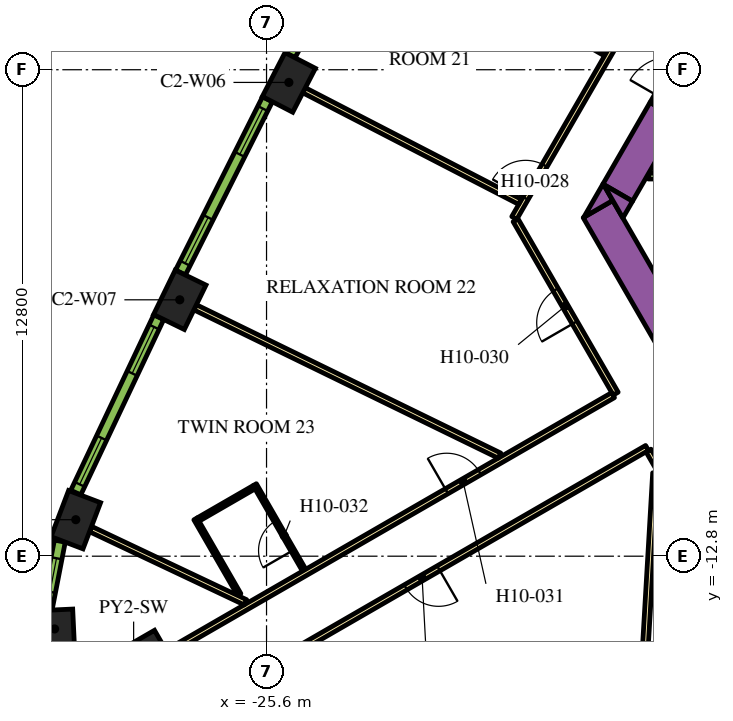
"""IFC4 building model, lengths in metres.
Left out: names, types, materials, properties, quantities, classifications, styles, units other than length and angle.
Written with IfcOpenShell. Run it as: python <this file> out.ifc"""

import sys

from ifc_helpers import new_model, si_unit, direction, frame, frame_2d, origin, origin_2d, place, context, subcontext, project, spatial, polyline, rectangle, outline, extrude, element, fill, save


model = new_model("IFC4")
c1 = context("Model", 3, precision=1e-05, world=origin(), true_north=direction((0.0, 1.0)))
c2 = subcontext(c1, "Body", "Model", "MODEL_VIEW")
j1 = project(units=[si_unit("LENGTHUNIT", "METRE"), si_unit("PLANEANGLEUNIT", "RADIAN")], contexts=[c1])
p1 = place(None, origin())
s1 = spatial("IfcSite", under=j1, at=p1, CompositionType="ELEMENT")
p2 = place(p1, origin())
s2 = spatial("IfcBuilding", under=s1, at=p2, CompositionType="ELEMENT")
p3 = place(p2, frame((0.0, 0.0, 130.5)))
s3 = spatial("IfcBuildingStorey", under=s2, at=p3, CompositionType="ELEMENT", Elevation=130.5)
p4 = place(p3, frame((-29.097, -16.799, 0.0), z_axis=(0.0, 0.0, 1.0), x_axis=(-0.866025403784, -0.5, 0.0)))
e1 = element("IfcColumn", 1, at=p4, inside=s3, PredefinedType="COLUMN", context=c2, shape_type="SweptSolid", body=[
    extrude(rectangle(XDim=3.0, YDim=3.0, at=origin_2d()), origin(), (0.0, 0.0, 1.0), 3.9),
])
for number, where, z_axis, x_axis in (
    (2, (-25.012, -0.334, 0.0), (0.0, 0.0, 1.0), (-0.459, -0.888, 0.0)),
    (3, (-27.883, -6.054, 0.0), (0.0, 0.0, 1.0), (-0.438, -0.899, 0.0)),
    (4, (-30.619, -11.839, 0.0), (0.0, 0.0, 1.0), (-0.355, -0.935, 0.0)),
):
    element("IfcColumn", number, at=place(p3, frame(where, z_axis=z_axis, x_axis=x_axis)), inside=s3, PredefinedType="COLUMN", context=c2, shape_type="SweptSolid", body=[
        extrude(rectangle(XDim=1.3, YDim=0.9, at=origin_2d()), origin(), (0.0, 0.0, 1.0), 3.9),
    ])
p5 = place(p3, frame((-31.177, -14.714, 0.0), z_axis=(0.0, 0.0, 1.0), x_axis=(0.046756026083, -0.998906338965, 0.0)))
e5 = element("IfcColumn", 5, at=p5, inside=s3, PredefinedType="COLUMN", context=c2, shape_type="SweptSolid", body=[
    extrude(rectangle(XDim=1.0, YDim=1.0, at=origin_2d()), origin(), (0.0, 0.0, 1.0), 3.9),
])
p6 = place(p3, frame((-12.134, -11.883, 0.0), z_axis=(0.0, 0.0, 1.0), x_axis=(-0.500005339912, 0.866022320763, 0.0)))
e6 = element("IfcWall", 6, at=p6, inside=s3, PredefinedType="SOLIDWALL", context=c2, shape_type="SweptSolid", body=[
    extrude(rectangle(XDim=9.488, YDim=0.9, at=frame_2d((4.744, 0.0))), origin(), (0.0, 0.0, 1.0), 3.9),
])
p7 = place(p3, origin())
e7 = element("IfcWall", 7, at=p7, inside=s3, PredefinedType="SOLIDWALL", context=c2, shape_type="SweptSolid", body=[
    extrude(outline(polyline([(-16.489, -3.44), (-17.251, -3.88), (-16.743, -3.0), (-16.489, -3.44)])), origin(), (0.0, 0.0, 1.0), 3.9),
])
p8 = place(p3, frame((-15.118, -1.085, 0.0), z_axis=(0.0, 0.0, 1.0), x_axis=(-0.50006606081, -0.865987260198, 0.0)))
e8 = element("IfcWall", 8, at=p8, inside=s3, PredefinedType="SOLIDWALL", context=c2, shape_type="SweptSolid", body=[
    extrude(rectangle(XDim=2.481, YDim=0.9, at=frame_2d((1.24, 0.0))), origin(), (0.0, 0.0, 1.0), 3.9),
])
e9 = element("IfcWall", 9, at=p7, inside=s3, PredefinedType="SOLIDWALL", context=c2, shape_type="SweptSolid", body=[
    extrude(outline(polyline([(-16.223, -3.9), (-16.732, -3.02), (-15.969, -3.46), (-16.223, -3.9)])), origin(), (0.0, 0.0, 1.0), 3.9),
])
p9 = place(p3, frame((-12.915, -2.8, 0.0), z_axis=(0.0, 0.0, 1.0), x_axis=(-1.0, 0.0, 0.0)))
e10 = element("IfcWall", 10, at=p9, inside=s3, PredefinedType="PARTITIONING", context=c2, shape_type="SweptSolid", body=[
    extrude(rectangle(XDim=2.637, YDim=0.15, at=frame_2d((1.318, 0.0))), origin(), (0.0, 0.0, 1.0), 2.6),
])
p10 = place(p3, frame((-15.118, -1.085, 0.0), z_axis=(0.0, 0.0, 1.0), x_axis=(0.500000056704, 0.866025371046, 0.0)))
e11 = element("IfcWall", 11, at=p10, inside=s3, PredefinedType="SOLIDWALL", context=c2, shape_type="SweptSolid", body=[
    extrude(rectangle(XDim=1.7, YDim=0.9, at=frame_2d((0.85, 0.0))), origin(), (0.0, 0.0, 1.0), 3.9),
])
p11 = place(p10, frame((0.25, 0.0, 0.0)))
e12 = element("IfcOpeningElement", 12, at=p11, cuts=e11, PredefinedType="OPENING", context=c2, shape_type="SweptSolid", body=[
    extrude(rectangle(XDim=1.2, YDim=2.1, at=frame_2d((0.6, 1.05))), frame((0.0, 0.46, 0.0), z_axis=(0.0, -1.0, 0.0), x_axis=(1.0, 0.0, 0.0)), (0.0, 0.0, 1.0), 0.92),
])
p12 = place(p3, frame((-19.081, -3.9, 0.0), z_axis=(0.0, 0.0, 1.0), x_axis=(0.499998313975, 0.866026377209, 0.0)))
e13 = element("IfcWall", 13, at=p12, inside=s3, PredefinedType="PARTITIONING", context=c2, shape_type="SweptSolid", body=[
    extrude(rectangle(XDim=25.766, YDim=0.15, at=frame_2d((12.883, 0.0))), origin(), (0.0, 0.0, 1.0), 2.6),
])
p13 = place(p12, frame((24.141, 0.0, 0.0)))
e14 = element("IfcOpeningElement", 14, at=p13, cuts=e13, PredefinedType="OPENING", context=c2, shape_type="SweptSolid", body=[
    extrude(rectangle(XDim=1.1, YDim=2.1, at=frame_2d((0.55, 1.05))), frame((0.0, 0.085, 0.0), z_axis=(0.0, -1.0, 0.0), x_axis=(1.0, 0.0, 0.0)), (0.0, 0.0, 1.0), 0.17),
])
p14 = place(p12, frame((13.144, 0.0, 0.0)))
e15 = element("IfcOpeningElement", 15, at=p14, cuts=e13, PredefinedType="OPENING", context=c2, shape_type="SweptSolid", body=[
    extrude(rectangle(XDim=1.0, YDim=2.1, at=frame_2d((0.5, 1.05))), frame((0.0, 0.085, 0.0), z_axis=(0.0, -1.0, 0.0), x_axis=(1.0, 0.0, 0.0)), (0.0, 0.0, 1.0), 0.17),
])
p15 = place(p12, frame((11.593, 0.0, 0.0)))
e16 = element("IfcOpeningElement", 16, at=p15, cuts=e13, PredefinedType="OPENING", context=c2, shape_type="SweptSolid", body=[
    extrude(rectangle(XDim=1.1, YDim=2.1, at=frame_2d((0.55, 1.05))), frame((0.0, 0.085, 0.0), z_axis=(0.0, -1.0, 0.0), x_axis=(1.0, 0.0, 0.0)), (0.0, 0.0, 1.0), 0.17),
])
p16 = place(p12, frame((0.596, 0.0, 0.0)))
e17 = element("IfcOpeningElement", 17, at=p16, cuts=e13, PredefinedType="OPENING", context=c2, shape_type="SweptSolid", body=[
    extrude(rectangle(XDim=1.0, YDim=2.1, at=frame_2d((0.5, 1.05))), frame((0.0, 0.085, 0.0), z_axis=(0.0, -1.0, 0.0), x_axis=(1.0, 0.0, 0.0)), (0.0, 0.0, 1.0), 0.17),
])
p17 = place(p3, frame((-16.412, -8.523, 0.0), z_axis=(0.0, 0.0, 1.0), x_axis=(-0.500001929737, 0.866024289647, 0.0)))
e18 = element("IfcWall", 18, at=p17, inside=s3, PredefinedType="PARTITIONING", context=c2, shape_type="SweptSolid", body=[
    extrude(rectangle(XDim=5.268, YDim=0.15, at=frame_2d((2.634, 0.0))), origin(), (0.0, 0.0, 1.0), 2.6),
])
p18 = place(p17, frame((2.157, 0.0, 0.0)))
e19 = element("IfcOpeningElement", 19, at=p18, cuts=e18, PredefinedType="OPENING", context=c2, shape_type="SweptSolid", body=[
    extrude(rectangle(XDim=1.0, YDim=2.1, at=frame_2d((0.5, 1.05))), frame((0.0, 0.085, 0.0), z_axis=(0.0, -1.0, 0.0), x_axis=(1.0, 0.0, 0.0)), (0.0, 0.0, 1.0), 0.17),
])
p19 = place(p3, frame((-28.211, -15.335, 0.0), z_axis=(0.0, 0.0, 1.0), x_axis=(0.866025884867, 0.49999916674, 0.0)))
e20 = element("IfcWall", 20, at=p19, inside=s3, PredefinedType="PARTITIONING", context=c2, shape_type="SweptSolid", body=[
    extrude(rectangle(XDim=13.543, YDim=0.15, at=frame_2d((6.772, 0.0))), origin(), (0.0, 0.0, 1.0), 2.6),
])
p20 = place(p19, frame((8.488, 0.0, 0.0)))
e21 = element("IfcOpeningElement", 21, at=p20, cuts=e20, PredefinedType="OPENING", context=c2, shape_type="SweptSolid", body=[
    extrude(rectangle(XDim=1.0, YDim=2.1, at=frame_2d((0.5, 1.05))), frame((0.0, 0.085, 0.0), z_axis=(0.0, -1.0, 0.0), x_axis=(1.0, 0.0, 0.0)), (0.0, 0.0, 1.0), 0.17),
])
p21 = place(p3, frame((-15.587, -9.952, 0.0), z_axis=(0.0, 0.0, 1.0), x_axis=(-0.866017869832, -0.500013048961, 0.0)))
e22 = element("IfcWall", 22, at=p21, inside=s3, PredefinedType="PARTITIONING", context=c2, shape_type="SweptSolid", body=[
    extrude(rectangle(XDim=13.624, YDim=0.15, at=frame_2d((6.812, 0.0))), origin(), (0.0, 0.0, 1.0), 2.6),
])
p22 = place(p21, frame((6.334, 0.0, 0.0)))
e23 = element("IfcOpeningElement", 23, at=p22, cuts=e22, PredefinedType="OPENING", context=c2, shape_type="SweptSolid", body=[
    extrude(rectangle(XDim=1.0, YDim=2.1, at=frame_2d((0.5, 1.05))), frame((0.0, 0.085, 0.0), z_axis=(0.0, -1.0, 0.0), x_axis=(1.0, 0.0, 0.0)), (0.0, 0.0, 1.0), 0.17),
])
p23 = place(p3, frame((-12.918, -14.575, 0.0), z_axis=(0.0, 0.0, 1.0), x_axis=(-0.500009150678, 0.866020120573, 0.0)))
e24 = element("IfcWall", 24, at=p23, inside=s3, PredefinedType="PARTITIONING", context=c2, shape_type="SweptSolid", body=[
    extrude(rectangle(XDim=5.258, YDim=0.15, at=frame_2d((2.629, 0.0))), origin(), (0.0, 0.0, 1.0), 2.6),
])
p24 = place(p3, frame((-30.231, -12.085, 0.0), z_axis=(0.0, 0.0, 1.0), x_axis=(0.904001132572, -0.427530060122, 0.0)))
e25 = element("IfcWall", 25, at=p24, inside=s3, PredefinedType="PARTITIONING", context=c2, shape_type="SweptSolid", body=[
    extrude(rectangle(XDim=4.51, YDim=0.15, at=frame_2d((2.255, 0.0))), origin(), (0.0, 0.0, 1.0), 2.6),
])
p25 = place(p3, frame((-27.479, -6.251, 0.0), z_axis=(0.0, 0.0, 1.0), x_axis=(0.898945877276, -0.438059710231, 0.0)))
e26 = element("IfcWall", 26, at=p25, inside=s3, PredefinedType="PARTITIONING", context=c2, shape_type="SweptSolid", body=[
    extrude(rectangle(XDim=8.909, YDim=0.15, at=frame_2d((4.455, 0.0))), origin(), (0.0, 0.0, 1.0), 2.6),
])
p26 = place(p3, frame((-24.613, -0.541, 0.0), z_axis=(0.0, 0.0, 1.0), x_axis=(0.888459912519, -0.458954228487, 0.0)))
e27 = element("IfcWall", 27, at=p26, inside=s3, PredefinedType="PARTITIONING", context=c2, shape_type="SweptSolid", body=[
    extrude(rectangle(XDim=6.392, YDim=0.15, at=frame_2d((3.196, 0.0))), origin(), (0.0, 0.0, 1.0), 2.6),
])
p27 = place(p3, frame((-15.999, -21.467, 0.0), z_axis=(0.0, 0.0, 1.0), x_axis=(0.058411453297, 0.998292593443, 0.0)))
e28 = element("IfcWall", 28, at=p27, inside=s3, PredefinedType="PARTITIONING", context=c2, shape_type="SweptSolid", body=[
    extrude(rectangle(XDim=10.875, YDim=0.15, at=frame_2d((5.438, 0.0))), origin(), (0.0, 0.0, 1.0), 2.6),
])
p28 = place(p3, frame((-18.933, 1.707, 0.0), z_axis=(0.0, 0.0, 1.0), x_axis=(0.866021400173, -0.500006934395, 0.0)))
e29 = element("IfcWall", 29, at=p28, inside=s3, PredefinedType="PARTITIONING", context=c2, shape_type="SweptSolid", body=[
    extrude(rectangle(XDim=2.6, YDim=0.1, at=frame_2d((1.3, 0.0))), origin(), (0.0, 0.0, 1.0), 2.6),
])
p29 = place(p28, frame((1.1, 0.0, 0.0)))
e30 = element("IfcOpeningElement", 30, at=p29, cuts=e29, PredefinedType="OPENING", context=c2, shape_type="SweptSolid", body=[
    extrude(rectangle(XDim=0.9, YDim=2.1, at=frame_2d((0.45, 1.05))), frame((0.0, 0.06, 0.0), z_axis=(0.0, -1.0, 0.0), x_axis=(1.0, 0.0, 0.0)), (0.0, 0.0, 1.0), 0.12),
])
p30 = place(p3, frame((-24.61, -13.169, 0.0), z_axis=(0.0, 0.0, 1.0), x_axis=(-0.500006934395, 0.866021400173, 0.0)))
e31 = element("IfcWall", 31, at=p30, inside=s3, PredefinedType="PARTITIONING", context=c2, shape_type="SweptSolid", body=[
    extrude(rectangle(XDim=2.6, YDim=0.1, at=frame_2d((1.3, 0.0))), origin(), (0.0, 0.0, 1.0), 2.6),
])
p31 = place(p30, frame((0.6, 0.0, 0.0)))
e32 = element("IfcOpeningElement", 32, at=p31, cuts=e31, PredefinedType="OPENING", context=c2, shape_type="SweptSolid", body=[
    extrude(rectangle(XDim=0.9, YDim=2.1, at=frame_2d((0.45, 1.05))), frame((0.0, 0.06, 0.0), z_axis=(0.0, -1.0, 0.0), x_axis=(1.0, 0.0, 0.0)), (0.0, 0.0, 1.0), 0.12),
])
p32 = place(p3, frame((-25.928, -10.986, 0.0), z_axis=(0.0, 0.0, 1.0), x_axis=(-0.865989465428, -0.500062241894, 0.0)))
e33 = element("IfcWall", 33, at=p32, inside=s3, PredefinedType="PARTITIONING", context=c2, shape_type="SweptSolid", body=[
    extrude(rectangle(XDim=1.7, YDim=0.1, at=frame_2d((0.85, 0.0))), origin(), (0.0, 0.0, 1.0), 2.6),
])
p33 = place(p3, frame((-26.319, -13.81, 0.0), z_axis=(0.0, 0.0, 1.0), x_axis=(-0.499952165731, 0.866053019151, 0.0)))
e34 = element("IfcWall", 34, at=p33, inside=s3, PredefinedType="PARTITIONING", context=c2, shape_type="SweptSolid", body=[
    extrude(rectangle(XDim=2.3, YDim=0.1, at=frame_2d((1.15, 0.0))), origin(), (0.0, 0.0, 1.0), 2.6),
])
p34 = place(p3, frame((-22.583, 4.887, 0.0), z_axis=(0.0, 0.0, 1.0), x_axis=(-0.469323203119, -0.883026461106, 0.0)))
e35 = element("IfcWall", 35, at=p34, inside=s3, PredefinedType="SOLIDWALL", context=c2, shape_type="SweptSolid", body=[
    extrude(rectangle(XDim=5.101, YDim=0.29, at=frame_2d((2.55, 0.0))), origin(), (0.0, 0.0, 1.0), 3.5),
])
p35 = place(p34, frame((0.273, 0.0, 0.9)))
e36 = element("IfcOpeningElement", 36, at=p35, cuts=e35, PredefinedType="OPENING", context=c2, shape_type="SweptSolid", body=[
    extrude(rectangle(XDim=1.35, YDim=2.15, at=frame_2d((0.675, 1.075))), frame((0.0, 0.155, 0.0), z_axis=(0.0, -1.0, 0.0), x_axis=(1.0, 0.0, 0.0)), (0.0, 0.0, 1.0), 0.31),
])
p36 = place(p34, frame((3.478, 0.0, 0.9)))
e37 = element("IfcOpeningElement", 37, at=p36, cuts=e35, PredefinedType="OPENING", context=c2, shape_type="SweptSolid", body=[
    extrude(rectangle(XDim=1.35, YDim=2.15, at=frame_2d((0.675, 1.075))), frame((0.0, 0.155, 0.0), z_axis=(0.0, -1.0, 0.0), x_axis=(1.0, 0.0, 0.0)), (0.0, 0.0, 1.0), 0.31),
])
p37 = place(p3, frame((-25.576, -0.778, 0.0), z_axis=(0.0, 0.0, 1.0), x_axis=(-0.448534297211, -0.893765620409, 0.0)))
e38 = element("IfcWall", 38, at=p37, inside=s3, PredefinedType="SOLIDWALL", context=c2, shape_type="SweptSolid", body=[
    extrude(rectangle(XDim=5.1, YDim=0.29, at=frame_2d((2.55, 0.0))), origin(), (0.0, 0.0, 1.0), 3.5),
])
p38 = place(p37, frame((0.272, 0.0, 0.9)))
e39 = element("IfcOpeningElement", 39, at=p38, cuts=e38, PredefinedType="OPENING", context=c2, shape_type="SweptSolid", body=[
    extrude(rectangle(XDim=1.35, YDim=2.15, at=frame_2d((0.675, 1.075))), frame((0.0, 0.155, 0.0), z_axis=(0.0, -1.0, 0.0), x_axis=(1.0, 0.0, 0.0)), (0.0, 0.0, 1.0), 0.31),
])
p39 = place(p37, frame((3.478, 0.0, 0.9)))
e40 = element("IfcOpeningElement", 40, at=p39, cuts=e38, PredefinedType="OPENING", context=c2, shape_type="SweptSolid", body=[
    extrude(rectangle(XDim=1.35, YDim=2.15, at=frame_2d((0.675, 1.075))), frame((0.0, 0.155, 0.0), z_axis=(0.0, -1.0, 0.0), x_axis=(1.0, 0.0, 0.0)), (0.0, 0.0, 1.0), 0.31),
])
p40 = place(p3, frame((-28.436, -6.511, 0.0), z_axis=(0.0, 0.0, 1.0), x_axis=(-0.427543726596, -0.903994669148, 0.0)))
e41 = element("IfcWall", 41, at=p40, inside=s3, PredefinedType="SOLIDWALL", context=c2, shape_type="SweptSolid", body=[
    extrude(rectangle(XDim=5.107, YDim=0.29, at=frame_2d((2.553, 0.0))), origin(), (0.0, 0.0, 1.0), 3.5),
])
p41 = place(p40, frame((0.285, 0.0, 0.9)))
e42 = element("IfcOpeningElement", 42, at=p41, cuts=e41, PredefinedType="OPENING", context=c2, shape_type="SweptSolid", body=[
    extrude(rectangle(XDim=1.35, YDim=2.15, at=frame_2d((0.675, 1.075))), frame((0.0, 0.155, 0.0), z_axis=(0.0, -1.0, 0.0), x_axis=(1.0, 0.0, 0.0)), (0.0, 0.0, 1.0), 0.31),
])
p42 = place(p40, frame((3.516, 0.0, 0.9)))
e43 = element("IfcOpeningElement", 43, at=p42, cuts=e41, PredefinedType="OPENING", context=c2, shape_type="SweptSolid", body=[
    extrude(rectangle(XDim=1.35, YDim=2.15, at=frame_2d((0.675, 1.075))), frame((0.0, 0.155, 0.0), z_axis=(0.0, -1.0, 0.0), x_axis=(1.0, 0.0, 0.0)), (0.0, 0.0, 1.0), 0.31),
])
p43 = place(p3, frame((-31.039, -12.403, 0.0), z_axis=(0.0, 0.0, 1.0), x_axis=(-0.190409913989, -0.981704672829, 0.0)))
e44 = element("IfcWall", 44, at=p43, inside=s3, PredefinedType="SOLIDWALL", context=c2, shape_type="SweptSolid", body=[
    extrude(rectangle(XDim=1.819, YDim=0.29, at=frame_2d((0.91, 0.0))), origin(), (0.0, 0.0, 1.0), 3.5),
])
p44 = place(p43, frame((0.46, 0.0, 0.9)))
e45 = element("IfcOpeningElement", 45, at=p44, cuts=e44, PredefinedType="OPENING", context=c2, shape_type="SweptSolid", body=[
    extrude(rectangle(XDim=0.9, YDim=2.15, at=frame_2d((0.45, 1.075))), frame((0.0, 0.155, 0.0), z_axis=(0.0, -1.0, 0.0), x_axis=(1.0, 0.0, 0.0)), (0.0, 0.0, 1.0), 0.31),
])
p45 = place(p22, origin())
e46 = element("IfcDoor", 46, at=p45, inside=s3, OperationType="SINGLE_SWING_LEFT", PredefinedType="DOOR", context=c2, shape_type="SweptSolid", body=[
    extrude(rectangle(XDim=1.0, YDim=2.1, at=frame_2d((0.5, 1.05))), frame((0.0, 0.025, 0.0), z_axis=(0.0, -1.0, 0.0), x_axis=(1.0, 0.0, 0.0)), (0.0, 0.0, 1.0), 0.05),
])
fill(e23, e46)
p46 = place(p16, origin())
e47 = element("IfcDoor", 47, at=p46, inside=s3, OperationType="SINGLE_SWING_LEFT", PredefinedType="DOOR", context=c2, shape_type="SweptSolid", body=[
    extrude(rectangle(XDim=1.0, YDim=2.1, at=frame_2d((0.5, 1.05))), frame((0.0, 0.025, 0.0), z_axis=(0.0, -1.0, 0.0), x_axis=(1.0, 0.0, 0.0)), (0.0, 0.0, 1.0), 0.05),
])
fill(e17, e47)
p47 = place(p18, origin())
e48 = element("IfcDoor", 48, at=p47, inside=s3, OperationType="SINGLE_SWING_RIGHT", PredefinedType="DOOR", context=c2, shape_type="SweptSolid", body=[
    extrude(rectangle(XDim=1.0, YDim=2.1, at=frame_2d((0.5, 1.05))), frame((0.0, 0.025, 0.0), z_axis=(0.0, -1.0, 0.0), x_axis=(1.0, 0.0, 0.0)), (0.0, 0.0, 1.0), 0.05),
])
fill(e19, e48)
p48 = place(p20, origin())
e49 = element("IfcDoor", 49, at=p48, inside=s3, OperationType="SINGLE_SWING_RIGHT", PredefinedType="DOOR", context=c2, shape_type="SweptSolid", body=[
    extrude(rectangle(XDim=1.0, YDim=2.1, at=frame_2d((0.5, 1.05))), frame((0.0, 0.025, 0.0), z_axis=(0.0, -1.0, 0.0), x_axis=(1.0, 0.0, 0.0)), (0.0, 0.0, 1.0), 0.05),
])
fill(e21, e49)
p49 = place(p31, origin())
e50 = element("IfcDoor", 50, at=p49, inside=s3, OperationType="SINGLE_SWING_LEFT", PredefinedType="DOOR", context=c2, shape_type="SweptSolid", body=[
    extrude(rectangle(XDim=0.9, YDim=2.1, at=frame_2d((0.45, 1.05))), frame((0.0, 0.025, 0.0), z_axis=(0.0, -1.0, 0.0), x_axis=(1.0, 0.0, 0.0)), (0.0, 0.0, 1.0), 0.05),
])
fill(e32, e50)
p50 = place(p38, origin())
e51 = element("IfcWindow", 51, at=p50, inside=s3, PartitioningType="DOUBLE_PANEL_VERTICAL", PredefinedType="WINDOW", context=c2, shape_type="SweptSolid", body=[
    extrude(rectangle(XDim=1.35, YDim=2.15, at=frame_2d((0.675, 1.075))), frame((0.0, 0.015, 0.0), z_axis=(0.0, -1.0, 0.0), x_axis=(1.0, 0.0, 0.0)), (0.0, 0.0, 1.0), 0.06),
])
fill(e39, e51)
p51 = place(p39, origin())
e52 = element("IfcWindow", 52, at=p51, inside=s3, PartitioningType="DOUBLE_PANEL_VERTICAL", PredefinedType="WINDOW", context=c2, shape_type="SweptSolid", body=[
    extrude(rectangle(XDim=1.35, YDim=2.15, at=frame_2d((0.675, 1.075))), frame((0.0, 0.015, 0.0), z_axis=(0.0, -1.0, 0.0), x_axis=(1.0, 0.0, 0.0)), (0.0, 0.0, 1.0), 0.06),
])
fill(e40, e52)
p52 = place(p41, origin())
e53 = element("IfcWindow", 53, at=p52, inside=s3, PartitioningType="DOUBLE_PANEL_VERTICAL", PredefinedType="WINDOW", context=c2, shape_type="SweptSolid", body=[
    extrude(rectangle(XDim=1.35, YDim=2.15, at=frame_2d((0.675, 1.075))), frame((0.0, 0.015, 0.0), z_axis=(0.0, -1.0, 0.0), x_axis=(1.0, 0.0, 0.0)), (0.0, 0.0, 1.0), 0.06),
])
fill(e42, e53)
p53 = place(p42, origin())
e54 = element("IfcWindow", 54, at=p53, inside=s3, PartitioningType="DOUBLE_PANEL_VERTICAL", PredefinedType="WINDOW", context=c2, shape_type="SweptSolid", body=[
    extrude(rectangle(XDim=1.35, YDim=2.15, at=frame_2d((0.675, 1.075))), frame((0.0, 0.015, 0.0), z_axis=(0.0, -1.0, 0.0), x_axis=(1.0, 0.0, 0.0)), (0.0, 0.0, 1.0), 0.06),
])
fill(e43, e54)
p54 = place(p44, origin())
e55 = element("IfcWindow", 55, at=p54, inside=s3, PartitioningType="SINGLE_PANEL", PredefinedType="WINDOW", context=c2, shape_type="SweptSolid", body=[
    extrude(rectangle(XDim=0.9, YDim=2.15, at=frame_2d((0.45, 1.075))), frame((0.0, 0.015, 0.0), z_axis=(0.0, -1.0, 0.0), x_axis=(1.0, 0.0, 0.0)), (0.0, 0.0, 1.0), 0.06),
])
fill(e45, e55)
save(model, sys.argv[1])
